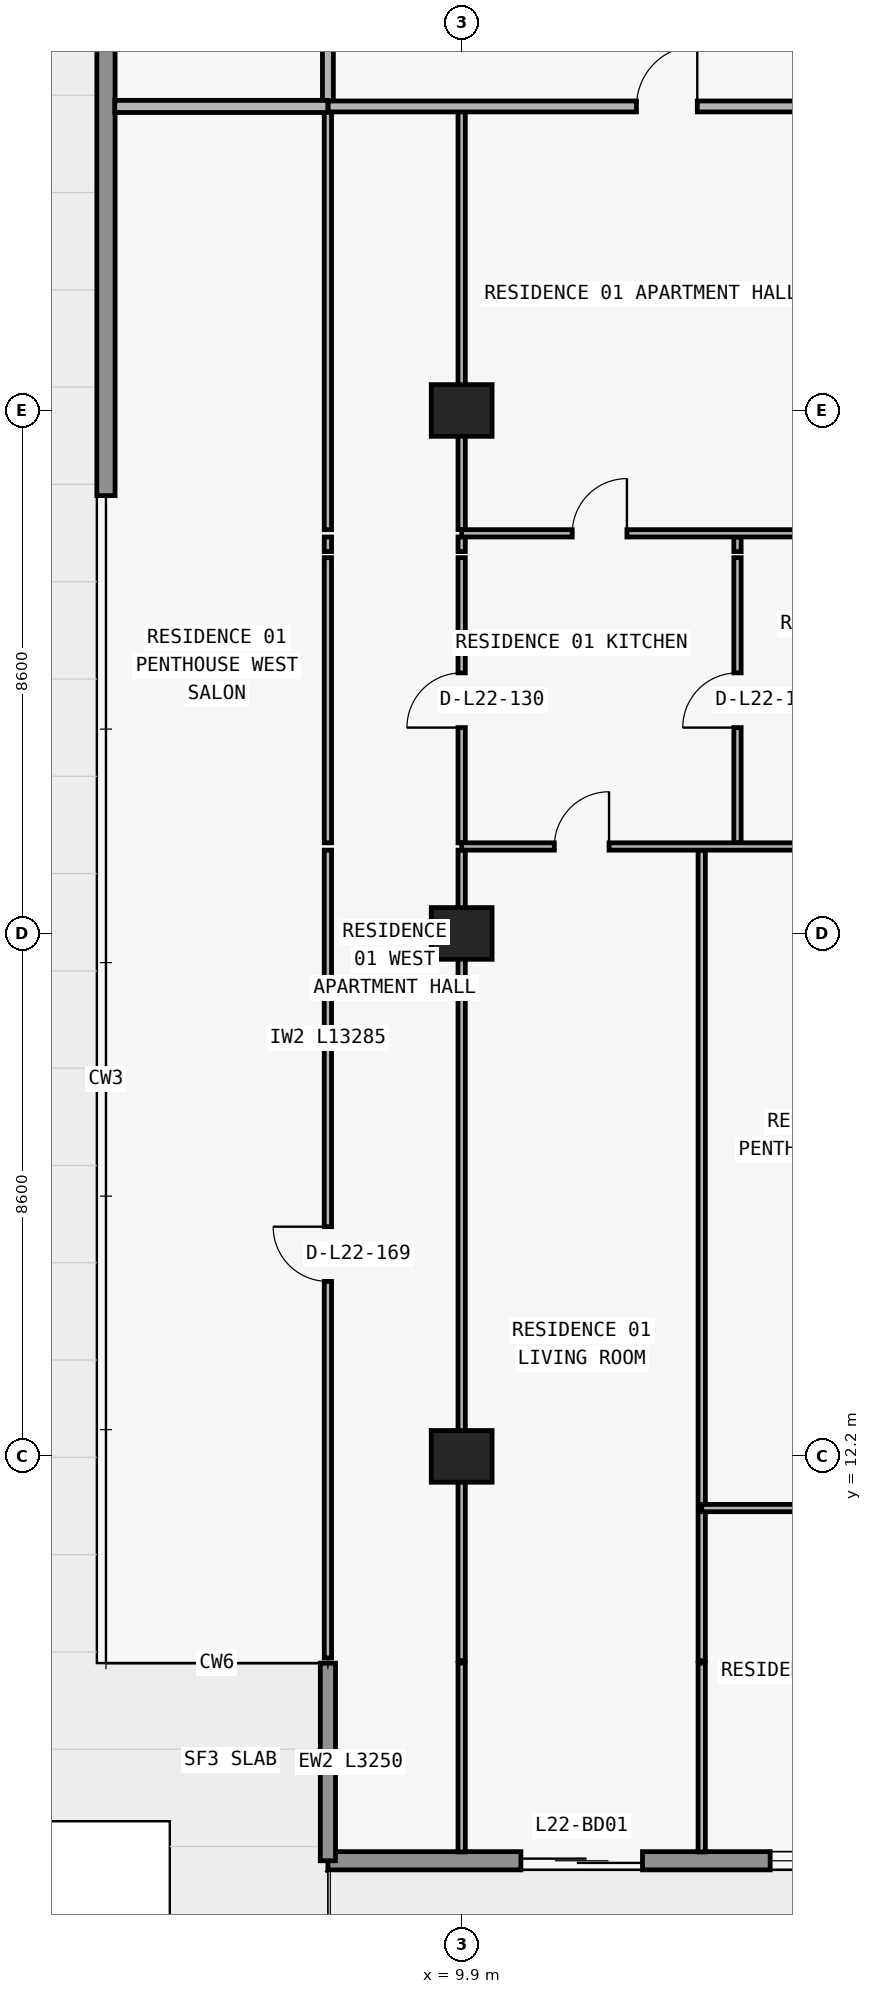
"""IFC4 building model, lengths in metres.
Left out: names, types, materials, properties, quantities, classifications, styles, units other than length and angle.
Written with IfcOpenShell. Run it as: python <this file> out.ifc"""

import sys

from ifc_helpers import new_model, si_unit, direction, frame, frame_2d, origin, origin_2d, place, context, subcontext, project, spatial, rectangle, extrude, element, fill, save


model = new_model("IFC4")
c1 = context("Model", 3, precision=1e-05, world=origin(), true_north=direction((0.0, 1.0)))
c2 = subcontext(c1, "Body", "Model", "MODEL_VIEW")
j1 = project(units=[si_unit("LENGTHUNIT", "METRE"), si_unit("PLANEANGLEUNIT", "RADIAN")], contexts=[c1])
p1 = place(None, origin())
s1 = spatial("IfcSite", under=j1, at=p1, CompositionType="ELEMENT")
p2 = place(p1, origin())
s2 = spatial("IfcBuilding", under=s1, at=p2, CompositionType="ELEMENT")
p3 = place(p2, frame((0.0, 0.0, 84.6)))
s3 = spatial("IfcBuildingStorey", under=s2, at=p3, CompositionType="ELEMENT", Elevation=84.6)
for number, where, z_axis, x_axis in (
    (1, (9.9, 12.2, 0.0), (0.0, 0.0, 1.0), (1.0, 0.0, 0.0)),
    (2, (9.9, 20.8, 0.0), (0.0, 0.0, 1.0), (1.0, 0.0, 0.0)),
    (3, (9.9, 29.4, 0.0), (0.0, 0.0, 1.0), (1.0, 0.0, 0.0)),
):
    element("IfcColumn", number, at=place(p3, frame(where, z_axis=z_axis, x_axis=x_axis)), inside=s3, PredefinedType="COLUMN", context=c2, shape_type="SweptSolid", body=[
        extrude(rectangle(XDim=1.0, YDim=0.85, at=origin_2d()), origin(), (0.0, 0.0, 1.0), 3.05),
    ])
p4 = place(p3, frame((70.1, 5.55, 0.0), z_axis=(0.0, 0.0, 1.0), x_axis=(-1.0, 0.0, 0.0)))
e4 = element("IfcWall", 4, at=p4, inside=s3, PredefinedType="STANDARD", context=c2, shape_type="SweptSolid", body=[
    extrude(rectangle(XDim=62.4, YDim=0.3, at=frame_2d((31.2, 0.0))), origin(), (0.0, 0.0, 1.0), 3.05),
])
p5 = place(p4, frame((57.226, 0.0, 0.0)))
e5 = element("IfcOpeningElement", 5, at=p5, cuts=e4, PredefinedType="OPENING", context=c2, shape_type="SweptSolid", body=[
    extrude(rectangle(XDim=2.0, YDim=2.3, at=frame_2d((1.0, 1.15))), frame((0.0, 0.16, 0.0), z_axis=(0.0, -1.0, 0.0), x_axis=(1.0, 0.0, 0.0)), (0.0, 0.0, 1.0), 0.32),
])
p6 = place(p4, frame((52.926, 0.0, 0.85)))
e6 = element("IfcOpeningElement", 6, at=p6, cuts=e4, PredefinedType="OPENING", context=c2, shape_type="SweptSolid", body=[
    extrude(rectangle(XDim=2.2, YDim=1.55, at=frame_2d((1.1, 0.775))), frame((0.0, 0.16, 0.0), z_axis=(0.0, -1.0, 0.0), x_axis=(1.0, 0.0, 0.0)), (0.0, 0.0, 1.0), 0.32),
])
p7 = place(p4, frame((48.49, 0.0, 0.0)))
e7 = element("IfcOpeningElement", 7, at=p7, cuts=e4, PredefinedType="OPENING", context=c2, shape_type="SweptSolid", body=[
    extrude(rectangle(XDim=2.0, YDim=2.3, at=frame_2d((1.0, 1.15))), frame((0.0, 0.16, 0.0), z_axis=(0.0, -1.0, 0.0), x_axis=(1.0, 0.0, 0.0)), (0.0, 0.0, 1.0), 0.32),
])
p8 = place(p4, frame((44.39, 0.0, 0.85)))
e8 = element("IfcOpeningElement", 8, at=p8, cuts=e4, PredefinedType="OPENING", context=c2, shape_type="SweptSolid", body=[
    extrude(rectangle(XDim=1.8, YDim=1.55, at=frame_2d((0.9, 0.775))), frame((0.0, 0.16, 0.0), z_axis=(0.0, -1.0, 0.0), x_axis=(1.0, 0.0, 0.0)), (0.0, 0.0, 1.0), 0.32),
])
p9 = place(p4, frame((40.426, 0.0, 0.0)))
e9 = element("IfcOpeningElement", 9, at=p9, cuts=e4, PredefinedType="OPENING", context=c2, shape_type="SweptSolid", body=[
    extrude(rectangle(XDim=2.0, YDim=2.3, at=frame_2d((1.0, 1.15))), frame((0.0, 0.16, 0.0), z_axis=(0.0, -1.0, 0.0), x_axis=(1.0, 0.0, 0.0)), (0.0, 0.0, 1.0), 0.32),
])
p10 = place(p4, frame((36.126, 0.0, 0.85)))
e10 = element("IfcOpeningElement", 10, at=p10, cuts=e4, PredefinedType="OPENING", context=c2, shape_type="SweptSolid", body=[
    extrude(rectangle(XDim=2.2, YDim=1.55, at=frame_2d((1.1, 0.775))), frame((0.0, 0.16, 0.0), z_axis=(0.0, -1.0, 0.0), x_axis=(1.0, 0.0, 0.0)), (0.0, 0.0, 1.0), 0.32),
])
p11 = place(p4, frame((32.09, 0.0, 0.0)))
e11 = element("IfcOpeningElement", 11, at=p11, cuts=e4, PredefinedType="OPENING", context=c2, shape_type="SweptSolid", body=[
    extrude(rectangle(XDim=2.0, YDim=2.3, at=frame_2d((1.0, 1.15))), frame((0.0, 0.16, 0.0), z_axis=(0.0, -1.0, 0.0), x_axis=(1.0, 0.0, 0.0)), (0.0, 0.0, 1.0), 0.32),
])
p12 = place(p4, frame((28.21, 0.0, 0.65)))
e12 = element("IfcOpeningElement", 12, at=p12, cuts=e4, PredefinedType="OPENING", context=c2, shape_type="SweptSolid", body=[
    extrude(rectangle(XDim=2.6, YDim=1.85, at=frame_2d((1.3, 0.925))), frame((0.0, 0.16, 0.0), z_axis=(0.0, -1.0, 0.0), x_axis=(1.0, 0.0, 0.0)), (0.0, 0.0, 1.0), 0.32),
])
p13 = place(p4, frame((22.1, 0.0, 0.85)))
e13 = element("IfcOpeningElement", 13, at=p13, cuts=e4, PredefinedType="OPENING", context=c2, shape_type="SweptSolid", body=[
    extrude(rectangle(XDim=2.2, YDim=1.55, at=frame_2d((1.1, 0.775))), frame((0.0, 0.16, 0.0), z_axis=(0.0, -1.0, 0.0), x_axis=(1.0, 0.0, 0.0)), (0.0, 0.0, 1.0), 0.32),
])
p14 = place(p4, frame((16.026, 0.0, 0.0)))
e14 = element("IfcOpeningElement", 14, at=p14, cuts=e4, PredefinedType="OPENING", context=c2, shape_type="SweptSolid", body=[
    extrude(rectangle(XDim=2.0, YDim=2.3, at=frame_2d((1.0, 1.15))), frame((0.0, 0.16, 0.0), z_axis=(0.0, -1.0, 0.0), x_axis=(1.0, 0.0, 0.0)), (0.0, 0.0, 1.0), 0.32),
])
p15 = place(p4, frame((11.726, 0.0, 0.85)))
e15 = element("IfcOpeningElement", 15, at=p15, cuts=e4, PredefinedType="OPENING", context=c2, shape_type="SweptSolid", body=[
    extrude(rectangle(XDim=2.2, YDim=1.55, at=frame_2d((1.1, 0.775))), frame((0.0, 0.16, 0.0), z_axis=(0.0, -1.0, 0.0), x_axis=(1.0, 0.0, 0.0)), (0.0, 0.0, 1.0), 0.32),
])
p16 = place(p4, frame((7.29, 0.0, 0.0)))
e16 = element("IfcOpeningElement", 16, at=p16, cuts=e4, PredefinedType="OPENING", context=c2, shape_type="SweptSolid", body=[
    extrude(rectangle(XDim=2.0, YDim=2.3, at=frame_2d((1.0, 1.15))), frame((0.0, 0.16, 0.0), z_axis=(0.0, -1.0, 0.0), x_axis=(1.0, 0.0, 0.0)), (0.0, 0.0, 1.0), 0.32),
])
p17 = place(p4, frame((3.19, 0.0, 0.85)))
e17 = element("IfcOpeningElement", 17, at=p17, cuts=e4, PredefinedType="OPENING", context=c2, shape_type="SweptSolid", body=[
    extrude(rectangle(XDim=1.8, YDim=1.55, at=frame_2d((0.9, 0.775))), frame((0.0, 0.16, 0.0), z_axis=(0.0, -1.0, 0.0), x_axis=(1.0, 0.0, 0.0)), (0.0, 0.0, 1.0), 0.32),
])
p18 = place(p3, frame((7.7, 8.8, 0.0), z_axis=(0.0, 0.0, 1.0), x_axis=(0.0, -1.0, 0.0)))
e18 = element("IfcWall", 18, at=p18, inside=s3, PredefinedType="ELEMENTEDWALL", context=c2, shape_type="SweptSolid", body=[
    extrude(rectangle(XDim=3.25, YDim=0.25, at=frame_2d((1.625, 0.0))), origin(), (0.0, 0.0, 1.0), 3.05),
])
p19 = place(p3, frame((4.05, 28.0, 0.0), z_axis=(0.0, 0.0, 1.0), x_axis=(0.0, 1.0, 0.0)))
e19 = element("IfcWall", 19, at=p19, inside=s3, PredefinedType="STANDARD", context=c2, shape_type="SweptSolid", body=[
    extrude(rectangle(XDim=19.2, YDim=0.3, at=frame_2d((9.6, 0.0))), origin(), (0.0, 0.0, 1.0), 3.05),
])
p20 = place(p3, frame((7.7, 8.885, 0.0), z_axis=(0.0, 0.0, 1.0), x_axis=(0.0, 1.0, 0.0)))
e20 = element("IfcWall", 20, at=p20, inside=s3, PredefinedType="PARTITIONING", context=c2, shape_type="SweptSolid", body=[
    extrude(rectangle(XDim=13.285, YDim=0.12, at=frame_2d((6.643, 0.0))), origin(), (0.0, 0.0, 1.0), 3.05),
])
p21 = place(p20, frame((6.192, 0.0, 0.0)))
e21 = element("IfcOpeningElement", 21, at=p21, cuts=e20, PredefinedType="OPENING", context=c2, shape_type="SweptSolid", body=[
    extrude(rectangle(XDim=0.9, YDim=2.15, at=frame_2d((0.45, 1.075))), frame((0.0, 0.07, 0.0), z_axis=(0.0, -1.0, 0.0), x_axis=(1.0, 0.0, 0.0)), (0.0, 0.0, 1.0), 0.14),
])
p22 = place(p3, frame((7.7, 22.29, 0.0), z_axis=(0.0, 0.0, 1.0), x_axis=(0.0, 1.0, 0.0)))
e22 = element("IfcWall", 22, at=p22, inside=s3, PredefinedType="PARTITIONING", context=c2, shape_type="SweptSolid", body=[
    extrude(rectangle(XDim=4.69, YDim=0.12, at=frame_2d((2.345, 0.0))), origin(), (0.0, 0.0, 1.0), 3.05),
])
p23 = place(p3, frame((7.7, 27.08, 0.0), z_axis=(0.0, 0.0, 1.0), x_axis=(0.0, 1.0, 0.0)))
e23 = element("IfcWall", 23, at=p23, inside=s3, PredefinedType="PARTITIONING", context=c2, shape_type="SweptSolid", body=[
    extrude(rectangle(XDim=0.24, YDim=0.12, at=frame_2d((0.12, 0.0))), origin(), (0.0, 0.0, 1.0), 3.05),
])
p24 = place(p3, frame((7.7, 27.44, 0.0), z_axis=(0.0, 0.0, 1.0), x_axis=(0.0, 1.0, 0.0)))
e24 = element("IfcWall", 24, at=p24, inside=s3, PredefinedType="PARTITIONING", context=c2, shape_type="SweptSolid", body=[
    extrude(rectangle(XDim=6.96, YDim=0.12, at=frame_2d((3.48, 0.0))), origin(), (0.0, 0.0, 1.0), 3.05),
])
p25 = place(p3, frame((7.7, 34.405, 0.0), z_axis=(0.0, 0.0, 1.0), x_axis=(0.0, 1.0, 0.0)))
e25 = element("IfcWall", 25, at=p25, inside=s3, PredefinedType="PARTITIONING", context=c2, shape_type="SweptSolid", body=[
    extrude(rectangle(XDim=2.545, YDim=0.18, at=frame_2d((1.272, 0.0))), origin(), (0.0, 0.0, 1.0), 3.05),
])
p26 = place(p3, frame((9.9, 5.695, 0.0), z_axis=(0.0, 0.0, 1.0), x_axis=(0.0, 1.0, 0.0)))
e26 = element("IfcWall", 26, at=p26, inside=s3, PredefinedType="PARTITIONING", context=c2, shape_type="SweptSolid", body=[
    extrude(rectangle(XDim=3.105, YDim=0.12, at=frame_2d((1.552, 0.0))), origin(), (0.0, 0.0, 1.0), 3.05),
])
p27 = place(p3, frame((9.9, 8.84, 0.0), z_axis=(0.0, 0.0, 1.0), x_axis=(0.0, 1.0, 0.0)))
e27 = element("IfcWall", 27, at=p27, inside=s3, PredefinedType="PARTITIONING", context=c2, shape_type="SweptSolid", body=[
    extrude(rectangle(XDim=13.33, YDim=0.12, at=frame_2d((6.665, 0.0))), origin(), (0.0, 0.0, 1.0), 2.174),
])
p28 = place(p3, frame((9.9, 22.29, 0.0), z_axis=(0.0, 0.0, 1.0), x_axis=(0.0, 1.0, 0.0)))
e28 = element("IfcWall", 28, at=p28, inside=s3, PredefinedType="PARTITIONING", context=c2, shape_type="SweptSolid", body=[
    extrude(rectangle(XDim=4.69, YDim=0.12, at=frame_2d((2.345, 0.0))), origin(), (0.0, 0.0, 1.0), 2.174),
])
p29 = place(p28, frame((1.895, 0.0, 0.0)))
e29 = element("IfcOpeningElement", 29, at=p29, cuts=e28, PredefinedType="OPENING", context=c2, shape_type="SweptSolid", body=[
    extrude(rectangle(XDim=0.9, YDim=2.124, at=frame_2d((0.45, 1.062))), frame((0.0, 0.07, 0.0), z_axis=(0.0, -1.0, 0.0), x_axis=(1.0, 0.0, 0.0)), (0.0, 0.0, 1.0), 0.14),
])
p30 = place(p3, frame((9.9, 27.08, 0.0), z_axis=(0.0, 0.0, 1.0), x_axis=(0.0, 1.0, 0.0)))
e30 = element("IfcWall", 30, at=p30, inside=s3, PredefinedType="PARTITIONING", context=c2, shape_type="SweptSolid", body=[
    extrude(rectangle(XDim=0.24, YDim=0.12, at=frame_2d((0.12, 0.0))), origin(), (0.0, 0.0, 1.0), 2.174),
])
p31 = place(p3, frame((9.9, 27.44, 0.0), z_axis=(0.0, 0.0, 1.0), x_axis=(0.0, 1.0, 0.0)))
e31 = element("IfcWall", 31, at=p31, inside=s3, PredefinedType="PARTITIONING", context=c2, shape_type="SweptSolid", body=[
    extrude(rectangle(XDim=6.96, YDim=0.12, at=frame_2d((3.48, 0.0))), origin(), (0.0, 0.0, 1.0), 2.174),
])
p32 = place(p3, frame((13.848, 5.695, 0.0), z_axis=(0.0, 0.0, 1.0), x_axis=(0.0, 1.0, 0.0)))
e32 = element("IfcWall", 32, at=p32, inside=s3, PredefinedType="PARTITIONING", context=c2, shape_type="SweptSolid", body=[
    extrude(rectangle(XDim=3.105, YDim=0.12, at=frame_2d((1.552, 0.0))), origin(), (0.0, 0.0, 1.0), 3.05),
])
p33 = place(p3, frame((13.848, 8.84, 0.0), z_axis=(0.0, 0.0, 1.0), x_axis=(0.0, 1.0, 0.0)))
e33 = element("IfcWall", 33, at=p33, inside=s3, PredefinedType="PARTITIONING", context=c2, shape_type="SweptSolid", body=[
    extrude(rectangle(XDim=13.33, YDim=0.12, at=frame_2d((6.665, 0.0))), origin(), (0.0, 0.0, 1.0), 3.05),
])
p34 = place(p3, frame((14.436, 22.29, 0.0), z_axis=(0.0, 0.0, 1.0), x_axis=(0.0, 1.0, 0.0)))
e34 = element("IfcWall", 34, at=p34, inside=s3, PredefinedType="PARTITIONING", context=c2, shape_type="SweptSolid", body=[
    extrude(rectangle(XDim=4.69, YDim=0.12, at=frame_2d((2.345, 0.0))), origin(), (0.0, 0.0, 1.0), 3.05),
])
p35 = place(p34, frame((1.895, 0.0, 0.0)))
e35 = element("IfcOpeningElement", 35, at=p35, cuts=e34, PredefinedType="OPENING", context=c2, shape_type="SweptSolid", body=[
    extrude(rectangle(XDim=0.9, YDim=2.15, at=frame_2d((0.45, 1.075))), frame((0.0, 0.07, 0.0), z_axis=(0.0, -1.0, 0.0), x_axis=(1.0, 0.0, 0.0)), (0.0, 0.0, 1.0), 0.14),
])
p36 = place(p3, frame((14.436, 27.08, 0.0), z_axis=(0.0, 0.0, 1.0), x_axis=(0.0, 1.0, 0.0)))
e36 = element("IfcWall", 36, at=p36, inside=s3, PredefinedType="PARTITIONING", context=c2, shape_type="SweptSolid", body=[
    extrude(rectangle(XDim=0.24, YDim=0.12, at=frame_2d((0.12, 0.0))), origin(), (0.0, 0.0, 1.0), 3.05),
])
p37 = place(p3, frame((13.848, 11.35, 0.0), z_axis=(0.0, 0.0, 1.0), x_axis=(1.0, 0.0, 0.0)))
e37 = element("IfcWall", 37, at=p37, inside=s3, PredefinedType="PARTITIONING", context=c2, shape_type="SweptSolid", body=[
    extrude(rectangle(XDim=4.402, YDim=0.12, at=frame_2d((2.201, 0.0))), origin(), (0.0, 0.0, 1.0), 3.05),
])
p38 = place(p37, frame((1.751, 0.0, 0.0)))
e38 = element("IfcOpeningElement", 38, at=p38, cuts=e37, PredefinedType="OPENING", context=c2, shape_type="SweptSolid", body=[
    extrude(rectangle(XDim=0.9, YDim=2.15, at=frame_2d((0.45, 1.075))), frame((0.0, 0.07, 0.0), z_axis=(0.0, -1.0, 0.0), x_axis=(1.0, 0.0, 0.0)), (0.0, 0.0, 1.0), 0.14),
])
p39 = place(p3, frame((9.9, 22.23, 0.0), z_axis=(0.0, 0.0, 1.0), x_axis=(1.0, 0.0, 0.0)))
e39 = element("IfcWall", 39, at=p39, inside=s3, PredefinedType="PARTITIONING", context=c2, shape_type="SweptSolid", body=[
    extrude(rectangle(XDim=8.35, YDim=0.12, at=frame_2d((4.175, 0.0))), origin(), (0.0, 0.0, 1.0), 3.05),
])
p40 = place(p39, frame((1.524, 0.0, 0.0)))
e40 = element("IfcOpeningElement", 40, at=p40, cuts=e39, PredefinedType="OPENING", context=c2, shape_type="SweptSolid", body=[
    extrude(rectangle(XDim=0.9, YDim=2.15, at=frame_2d((0.45, 1.075))), frame((0.0, 0.07, 0.0), z_axis=(0.0, -1.0, 0.0), x_axis=(1.0, 0.0, 0.0)), (0.0, 0.0, 1.0), 0.14),
])
p41 = place(p39, frame((5.993, 0.0, 0.0)))
e41 = element("IfcOpeningElement", 41, at=p41, cuts=e39, PredefinedType="OPENING", context=c2, shape_type="SweptSolid", body=[
    extrude(rectangle(XDim=0.9, YDim=2.15, at=frame_2d((0.45, 1.075))), frame((0.0, 0.07, 0.0), z_axis=(0.0, -1.0, 0.0), x_axis=(1.0, 0.0, 0.0)), (0.0, 0.0, 1.0), 0.14),
])
p42 = place(p3, frame((9.9, 27.38, 0.0), z_axis=(0.0, 0.0, 1.0), x_axis=(1.0, 0.0, 0.0)))
e42 = element("IfcWall", 42, at=p42, inside=s3, PredefinedType="PARTITIONING", context=c2, shape_type="SweptSolid", body=[
    extrude(rectangle(XDim=8.35, YDim=0.12, at=frame_2d((4.175, 0.0))), origin(), (0.0, 0.0, 1.0), 3.05),
])
p43 = place(p42, frame((1.818, 0.0, 0.0)))
e43 = element("IfcOpeningElement", 43, at=p43, cuts=e42, PredefinedType="OPENING", context=c2, shape_type="SweptSolid", body=[
    extrude(rectangle(XDim=0.9, YDim=2.15, at=frame_2d((0.45, 1.075))), frame((0.0, 0.07, 0.0), z_axis=(0.0, -1.0, 0.0), x_axis=(1.0, 0.0, 0.0)), (0.0, 0.0, 1.0), 0.14),
])
p44 = place(p3, frame((4.195, 34.4, 0.0), z_axis=(0.0, 0.0, 1.0), x_axis=(1.0, 0.0, 0.0)))
e44 = element("IfcWall", 44, at=p44, inside=s3, PredefinedType="PARTITIONING", context=c2, shape_type="SweptSolid", body=[
    extrude(rectangle(XDim=3.505, YDim=0.2, at=frame_2d((1.752, 0.0))), origin(), (0.0, 0.0, 1.0), 3.05),
])
p45 = place(p3, frame((7.705, 34.4, 0.0), z_axis=(0.0, 0.0, 1.0), x_axis=(1.0, 0.0, 0.0)))
e45 = element("IfcWall", 45, at=p45, inside=s3, PredefinedType="PARTITIONING", context=c2, shape_type="SweptSolid", body=[
    extrude(rectangle(XDim=10.545, YDim=0.18, at=frame_2d((5.272, 0.0))), origin(), (0.0, 0.0, 1.0), 3.05),
])
p46 = place(p45, frame((5.07, 0.0, 0.0)))
e46 = element("IfcOpeningElement", 46, at=p46, cuts=e45, PredefinedType="OPENING", context=c2, shape_type="SweptSolid", body=[
    extrude(rectangle(XDim=1.0, YDim=2.2, at=frame_2d((0.5, 1.1))), frame((0.0, 0.1, 0.0), z_axis=(0.0, -1.0, 0.0), x_axis=(1.0, 0.0, 0.0)), (0.0, 0.0, 1.0), 0.2),
])
p47 = place(p5, origin())
e47 = element("IfcDoor", 47, at=p47, inside=s3, OperationType="DOUBLE_DOOR_SLIDING", PredefinedType="DOOR", context=c2, shape_type="SweptSolid", body=[
    extrude(rectangle(XDim=2.0, YDim=2.3, at=frame_2d((1.0, 1.15))), frame((0.0, 0.025, 0.0), z_axis=(0.0, -1.0, 0.0), x_axis=(1.0, 0.0, 0.0)), (0.0, 0.0, 1.0), 0.05),
])
fill(e5, e47)
p48 = place(p6, origin())
e48 = element("IfcWindow", 48, at=p48, inside=s3, PartitioningType="SINGLE_PANEL", PredefinedType="WINDOW", context=c2, shape_type="SweptSolid", body=[
    extrude(rectangle(XDim=2.2, YDim=1.55, at=frame_2d((1.1, 0.775))), frame((0.0, 0.03, 0.0), z_axis=(0.0, -1.0, 0.0), x_axis=(1.0, 0.0, 0.0)), (0.0, 0.0, 1.0), 0.06),
])
fill(e6, e48)
p49 = place(p46, origin())
e49 = element("IfcDoor", 49, at=p49, inside=s3, OperationType="SINGLE_SWING_RIGHT", PredefinedType="DOOR", context=c2, shape_type="SweptSolid", body=[
    extrude(rectangle(XDim=1.0, YDim=2.2, at=frame_2d((0.5, 1.1))), frame((0.0, 0.025, 0.0), z_axis=(0.0, -1.0, 0.0), x_axis=(1.0, 0.0, 0.0)), (0.0, 0.0, 1.0), 0.05),
])
fill(e46, e49)
p50 = place(p43, origin())
e50 = element("IfcDoor", 50, at=p50, inside=s3, OperationType="SINGLE_SWING_RIGHT", PredefinedType="DOOR", context=c2, shape_type="SweptSolid", body=[
    extrude(rectangle(XDim=0.9, YDim=2.15, at=frame_2d((0.45, 1.075))), frame((0.0, 0.025, 0.0), z_axis=(0.0, -1.0, 0.0), x_axis=(1.0, 0.0, 0.0)), (0.0, 0.0, 1.0), 0.05),
])
fill(e43, e50)
p51 = place(p35, origin())
e51 = element("IfcDoor", 51, at=p51, inside=s3, OperationType="SINGLE_SWING_LEFT", PredefinedType="DOOR", context=c2, shape_type="SweptSolid", body=[
    extrude(rectangle(XDim=0.9, YDim=2.15, at=frame_2d((0.45, 1.075))), frame((0.0, 0.025, 0.0), z_axis=(0.0, -1.0, 0.0), x_axis=(1.0, 0.0, 0.0)), (0.0, 0.0, 1.0), 0.05),
])
fill(e35, e51)
p52 = place(p40, origin())
e52 = element("IfcDoor", 52, at=p52, inside=s3, OperationType="SINGLE_SWING_RIGHT", PredefinedType="DOOR", context=c2, shape_type="SweptSolid", body=[
    extrude(rectangle(XDim=0.9, YDim=2.15, at=frame_2d((0.45, 1.075))), frame((0.0, 0.025, 0.0), z_axis=(0.0, -1.0, 0.0), x_axis=(1.0, 0.0, 0.0)), (0.0, 0.0, 1.0), 0.05),
])
fill(e40, e52)
p53 = place(p29, origin())
e53 = element("IfcDoor", 53, at=p53, inside=s3, OperationType="SINGLE_SWING_LEFT", PredefinedType="DOOR", context=c2, shape_type="SweptSolid", body=[
    extrude(rectangle(XDim=0.9, YDim=2.124, at=frame_2d((0.45, 1.062))), frame((0.0, 0.025, 0.0), z_axis=(0.0, -1.0, 0.0), x_axis=(1.0, 0.0, 0.0)), (0.0, 0.0, 1.0), 0.05),
])
fill(e29, e53)
p54 = place(p21, origin())
e54 = element("IfcDoor", 54, at=p54, inside=s3, OperationType="SINGLE_SWING_RIGHT", PredefinedType="DOOR", context=c2, shape_type="SweptSolid", body=[
    extrude(rectangle(XDim=0.9, YDim=2.15, at=frame_2d((0.45, 1.075))), frame((0.0, 0.025, 0.0), z_axis=(0.0, -1.0, 0.0), x_axis=(1.0, 0.0, 0.0)), (0.0, 0.0, 1.0), 0.05),
])
fill(e21, e54)
save(model, sys.argv[1])
